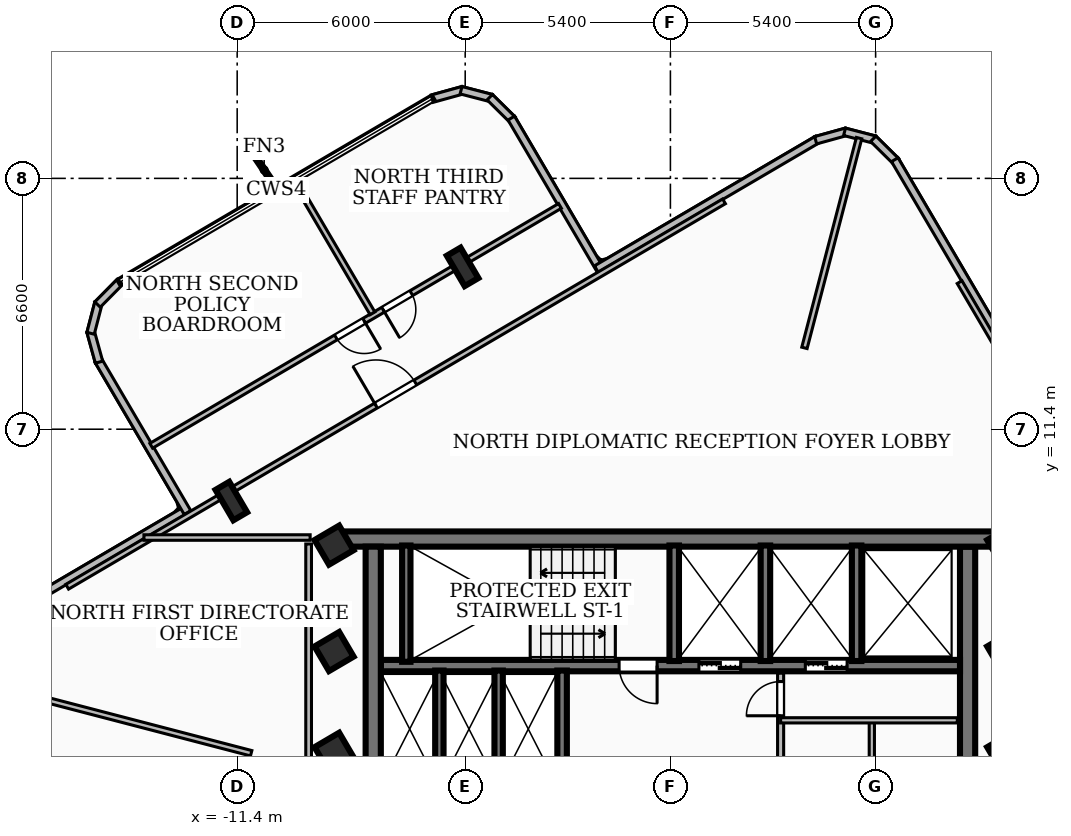
"""IFC4 building model, lengths in metres.
Left out: names, types, materials, properties, quantities, classifications, styles, units other than length and angle.
Written with IfcOpenShell. Run it as: python <this file> out.ifc"""

import sys

from ifc_helpers import new_model, si_unit, direction, frame, frame_2d, origin, origin_2d, place, context, subcontext, project, spatial, rectangle, i_section, extrude, element, fill, save


model = new_model("IFC4")
c1 = context("Model", 3, precision=1e-05, world=origin(), true_north=direction((0.0, 1.0)))
c2 = subcontext(c1, "Body", "Model", "MODEL_VIEW")
j1 = project(units=[si_unit("LENGTHUNIT", "METRE"), si_unit("PLANEANGLEUNIT", "RADIAN")], contexts=[c1])
p1 = place(None, origin())
s1 = spatial("IfcSite", under=j1, at=p1, CompositionType="ELEMENT")
p2 = place(p1, origin())
s2 = spatial("IfcBuilding", under=s1, at=p2, CompositionType="ELEMENT")
p3 = place(p2, frame((0.0, 0.0, 212.04)))
s3 = spatial("IfcBuildingStorey", under=s2, at=p3, CompositionType="ELEMENT", Elevation=212.04)
p4 = place(p3, frame((-8.78, 8.51, 0.0), z_axis=(0.0, 0.0, 1.0), x_axis=(1.0, 0.0, 0.0)))
e1 = element("IfcWall", 1, at=p4, inside=s3, PredefinedType="SHEAR", context=c2, shape_type="SweptSolid", body=[
    extrude(rectangle(XDim=17.56, YDim=0.4, at=frame_2d((8.78, 0.0))), origin(), (0.0, 0.0, 1.0), 3.16),
])
for number, where, z_axis, x_axis in (
    (2, (-7.82, 1.95, 0.0), (0.0, 0.0, 1.0), (0.0, 1.0, 0.0)),
    (3, (7.82, 8.31, 0.0), (0.0, 0.0, 1.0), (0.0, -1.0, 0.0)),
):
    element("IfcWall", number, at=place(p3, frame(where, z_axis=z_axis, x_axis=x_axis)), inside=s3, PredefinedType="SHEAR", context=c2, shape_type="SweptSolid", body=[
        extrude(rectangle(XDim=6.36, YDim=0.4, at=frame_2d((3.18, 0.0))), origin(), (0.0, 0.0, 1.0), 3.16),
    ])
p5 = place(p3, frame((7.62, 5.18, 0.0), z_axis=(0.0, 0.0, 1.0), x_axis=(-1.0, 0.0, 0.0)))
e4 = element("IfcWall", 4, at=p5, inside=s3, PredefinedType="SOLIDWALL", context=c2, shape_type="SweptSolid", body=[
    extrude(rectangle(XDim=15.24, YDim=0.3, at=frame_2d((7.62, 0.0))), origin(), (0.0, 0.0, 1.0), 3.16),
])
p6 = place(p5, frame((5.77, 0.0, 0.0)))
e5 = element("IfcOpeningElement", 5, at=p6, cuts=e4, PredefinedType="OPENING", context=c2, shape_type="SweptSolid", body=[
    extrude(rectangle(XDim=1.1, YDim=2.15, at=frame_2d((0.55, 1.075))), frame((0.0, 0.16, 0.0), z_axis=(0.0, -1.0, 0.0), x_axis=(1.0, 0.0, 0.0)), (0.0, 0.0, 1.0), 0.32),
])
p7 = place(p5, frame((2.97, 0.0, 0.0)))
e6 = element("IfcOpeningElement", 6, at=p7, cuts=e4, PredefinedType="OPENING", context=c2, shape_type="SweptSolid", body=[
    extrude(rectangle(XDim=1.1, YDim=2.15, at=frame_2d((0.55, 1.075))), frame((0.0, 0.16, 0.0), z_axis=(0.0, -1.0, 0.0), x_axis=(1.0, 0.0, 0.0)), (0.0, 0.0, 1.0), 0.32),
])
p8 = place(p5, frame((7.97, 0.0, 0.0)))
e7 = element("IfcOpeningElement", 7, at=p8, cuts=e4, PredefinedType="OPENING", context=c2, shape_type="SweptSolid", body=[
    extrude(rectangle(XDim=1.0, YDim=2.1, at=frame_2d((0.5, 1.05))), frame((0.0, 0.16, 0.0), z_axis=(0.0, -1.0, 0.0), x_axis=(1.0, 0.0, 0.0)), (0.0, 0.0, 1.0), 0.32),
])
p9 = place(p3, frame((-6.95, 5.28, 0.0), z_axis=(0.0, 0.0, 1.0), x_axis=(0.0, 1.0, 0.0)))
e8 = element("IfcWall", 8, at=p9, inside=s3, PredefinedType="SOLIDWALL", context=c2, shape_type="SweptSolid", body=[
    extrude(rectangle(XDim=3.06, YDim=0.22, at=frame_2d((1.53, 0.0))), origin(), (0.0, 0.0, 1.0), 3.16),
])
for number, where, z_axis, x_axis in (
    (9, (0.1, 5.3, 0.0), (0.0, 0.0, 1.0), (0.0, 1.0, 0.0)),
    (10, (2.5, 5.3, 0.0), (0.0, 0.0, 1.0), (0.0, 1.0, 0.0)),
    (11, (4.9, 5.3, 0.0), (0.0, 0.0, 1.0), (0.0, 1.0, 0.0)),
):
    element("IfcWall", number, at=place(p3, frame(where, z_axis=z_axis, x_axis=x_axis)), inside=s3, PredefinedType="SOLIDWALL", context=c2, shape_type="SweptSolid", body=[
        extrude(rectangle(XDim=3.04, YDim=0.25, at=frame_2d((1.52, 0.0))), origin(), (0.0, 0.0, 1.0), 3.16),
    ])
p10 = place(p3, frame((-2.85, 1.98, 0.0), z_axis=(0.0, 0.0, 1.0), x_axis=(0.0, 1.0, 0.0)))
e12 = element("IfcWall", 12, at=p10, inside=s3, PredefinedType="SOLIDWALL", context=c2, shape_type="SweptSolid", body=[
    extrude(rectangle(XDim=3.07, YDim=0.25, at=frame_2d((1.535, 0.0))), origin(), (0.0, 0.0, 1.0), 3.16),
])
for number, where, z_axis, x_axis in (
    (13, (-6.08, 1.98, 0.0), (0.0, 0.0, 1.0), (0.0, 1.0, 0.0)),
    (14, (-4.52, 1.98, 0.0), (0.0, 0.0, 1.0), (0.0, 1.0, 0.0)),
):
    element("IfcWall", number, at=place(p3, frame(where, z_axis=z_axis, x_axis=x_axis)), inside=s3, PredefinedType="SOLIDWALL", context=c2, shape_type="SweptSolid", body=[
        extrude(rectangle(XDim=3.07, YDim=0.22, at=frame_2d((1.535, 0.0))), origin(), (0.0, 0.0, 1.0), 3.16),
    ])
for number, where, z_axis, x_axis in (
    (15, (-8.85, 2.9, 0.0), (0.0, 0.0, 1.0), (0.863, 0.506, 0.0)),
    (16, (-8.85, 5.55, 0.0), (0.0, 0.0, 1.0), (0.863, 0.506, 0.0)),
    (17, (8.85, 2.9, 0.0), (0.0, 0.0, 1.0), (0.863, 0.506, 0.0)),
    (18, (8.85, 5.55, 0.0), (0.0, 0.0, 1.0), (0.863, 0.506, 0.0)),
    (19, (-8.85, 8.35, 0.0), (0.0, 0.0, 1.0), (0.863, 0.506, 0.0)),
    (20, (8.85, 8.35, 0.0), (0.0, 0.0, 1.0), (0.863, 0.506, 0.0)),
):
    element("IfcColumn", number, at=place(p3, frame(where, z_axis=z_axis, x_axis=x_axis)), inside=s3, PredefinedType="COLUMN", context=c2, shape_type="SweptSolid", body=[
        extrude(rectangle(XDim=0.75, YDim=0.75, at=origin_2d()), origin(), (0.0, 0.0, 1.0), 3.42),
    ])
for number, where, z_axis, x_axis in (
    (21, (-5.468, 15.671, 0.0), (0.0, 0.0, 1.0), (0.863, 0.506, 0.0)),
    (22, (-11.554, 9.51, 0.0), (0.0, 0.0, 1.0), (0.863, 0.506, 0.0)),
):
    element("IfcColumn", number, at=place(p3, frame(where, z_axis=z_axis, x_axis=x_axis)), inside=s3, PredefinedType="COLUMN", context=c2, shape_type="SweptSolid", body=[
        extrude(i_section(OverallWidth=0.418, OverallDepth=0.927, WebThickness=0.019, FlangeThickness=0.032, at=origin_2d()), origin(), (0.0, 0.0, 1.0), 3.42),
    ])
p11 = place(p3, frame((-5.904, -18.492, 0.0), z_axis=(0.0, 0.0, 1.0), x_axis=(-0.506046465446, 0.862506217258, 0.0)))
e23 = element("IfcWall", 23, at=p11, inside=s3, PredefinedType="SOLIDWALL", context=c2, shape_type="SweptSolid", body=[
    extrude(rectangle(XDim=25.924, YDim=0.2, at=frame_2d((12.962, 0.0))), origin(), (0.0, 0.0, 1.0), 3.16),
])
p12 = place(p11, frame((0.85, 0.0, 0.85)))
e24 = element("IfcOpeningElement", 24, at=p12, cuts=e23, PredefinedType="OPENING", context=c2, shape_type="SweptSolid", body=[
    extrude(rectangle(XDim=2.4, YDim=1.85, at=frame_2d((1.2, 0.925))), frame((0.0, 0.11, 0.0), z_axis=(0.0, -1.0, 0.0), x_axis=(1.0, 0.0, 0.0)), (0.0, 0.0, 1.0), 0.22),
])
p13 = place(p3, frame((-18.492, 5.904, 0.0), z_axis=(0.0, 0.0, 1.0), x_axis=(0.86245977502, 0.506125613333, 0.0)))
e25 = element("IfcWall", 25, at=p13, inside=s3, PredefinedType="SOLIDWALL", context=c2, shape_type="SweptSolid", body=[
    extrude(rectangle(XDim=6.741, YDim=0.2, at=frame_2d((3.371, 0.0))), origin(), (0.0, 0.0, 1.0), 3.16),
])
p14 = place(p3, frame((-12.707, 9.207, 0.0), z_axis=(0.0, 0.0, 1.0), x_axis=(-0.505936854923, 0.862570518178, 0.0)))
e26 = element("IfcWall", 26, at=p14, inside=s3, PredefinedType="SOLIDWALL", context=c2, shape_type="SweptSolid", body=[
    extrude(rectangle(XDim=4.641, YDim=0.2, at=frame_2d((2.32, 0.0))), origin(), (0.0, 0.0, 1.0), 3.16),
])
p15 = place(p3, frame((-15.035, 13.164, 0.0), z_axis=(0.0, 0.0, 1.0), x_axis=(-0.266246353668, 0.963905015631, 0.0)))
e27 = element("IfcWall", 27, at=p15, inside=s3, PredefinedType="SOLIDWALL", context=c2, shape_type="SweptSolid", body=[
    extrude(rectangle(XDim=0.838, YDim=0.2, at=frame_2d((0.419, 0.0))), origin(), (0.0, 0.0, 1.0), 3.16),
])
p16 = place(p3, frame((-15.257, 13.924, 0.0), z_axis=(0.0, 0.0, 1.0), x_axis=(0.251167733737, 0.967943577658, 0.0)))
e28 = element("IfcWall", 28, at=p16, inside=s3, PredefinedType="SOLIDWALL", context=c2, shape_type="SweptSolid", body=[
    extrude(rectangle(XDim=0.824, YDim=0.2, at=frame_2d((0.412, 0.0))), origin(), (0.0, 0.0, 1.0), 3.16),
])
p17 = place(p3, frame((-15.074, 14.68, 0.0), z_axis=(0.0, 0.0, 1.0), x_axis=(0.702877524881, 0.711310891957, 0.0)))
e29 = element("IfcWall", 29, at=p17, inside=s3, PredefinedType="SOLIDWALL", context=c2, shape_type="SweptSolid", body=[
    extrude(rectangle(XDim=0.84, YDim=0.2, at=frame_2d((0.42, 0.0))), origin(), (0.0, 0.0, 1.0), 3.16),
])
p18 = place(p3, frame((-6.269, 20.097, 0.0), z_axis=(0.0, 0.0, 1.0), x_axis=(0.963925656212, 0.266171616247, 0.0)))
e30 = element("IfcWall", 30, at=p18, inside=s3, PredefinedType="SOLIDWALL", context=c2, shape_type="SweptSolid", body=[
    extrude(rectangle(XDim=0.838, YDim=0.2, at=frame_2d((0.419, 0.0))), origin(), (0.0, 0.0, 1.0), 3.16),
])
p19 = place(p3, frame((-5.509, 20.319, 0.0), z_axis=(0.0, 0.0, 1.0), x_axis=(0.967962254737, -0.251095745493, 0.0)))
e31 = element("IfcWall", 31, at=p19, inside=s3, PredefinedType="SOLIDWALL", context=c2, shape_type="SweptSolid", body=[
    extrude(rectangle(XDim=0.824, YDim=0.2, at=frame_2d((0.412, 0.0))), origin(), (0.0, 0.0, 1.0), 3.16),
])
p20 = place(p3, frame((-4.753, 20.136, 0.0), z_axis=(0.0, 0.0, 1.0), x_axis=(0.711167178618, -0.70302293281, 0.0)))
e32 = element("IfcWall", 32, at=p20, inside=s3, PredefinedType="SOLIDWALL", context=c2, shape_type="SweptSolid", body=[
    extrude(rectangle(XDim=0.839, YDim=0.2, at=frame_2d((0.42, 0.0))), origin(), (0.0, 0.0, 1.0), 3.16),
])
p21 = place(p3, frame((-4.187, 19.586, 0.0), z_axis=(0.0, 0.0, 1.0), x_axis=(0.505936854923, -0.862570518178, 0.0)))
e33 = element("IfcWall", 33, at=p21, inside=s3, PredefinedType="SOLIDWALL", context=c2, shape_type="SweptSolid", body=[
    extrude(rectangle(XDim=4.641, YDim=0.2, at=frame_2d((2.32, 0.0))), origin(), (0.0, 0.0, 1.0), 3.16),
])
p22 = place(p3, frame((-1.948, 15.612, 0.0), z_axis=(0.0, 0.0, 1.0), x_axis=(0.86259717351, 0.505891407569, 0.0)))
e34 = element("IfcWall", 34, at=p22, inside=s3, PredefinedType="SOLIDWALL", context=c2, shape_type="SweptSolid", body=[
    extrude(rectangle(XDim=6.742, YDim=0.2, at=frame_2d((3.371, 0.0))), origin(), (0.0, 0.0, 1.0), 3.16),
])
p23 = place(p3, frame((3.822, 19.003, 0.0), z_axis=(0.0, 0.0, 1.0), x_axis=(0.963905015631, 0.266246353668, 0.0)))
e35 = element("IfcWall", 35, at=p23, inside=s3, PredefinedType="SOLIDWALL", context=c2, shape_type="SweptSolid", body=[
    extrude(rectangle(XDim=0.838, YDim=0.2, at=frame_2d((0.419, 0.0))), origin(), (0.0, 0.0, 1.0), 3.16),
])
p24 = place(p3, frame((4.582, 19.225, 0.0), z_axis=(0.0, 0.0, 1.0), x_axis=(0.967943577658, -0.251167733737, 0.0)))
e36 = element("IfcWall", 36, at=p24, inside=s3, PredefinedType="SOLIDWALL", context=c2, shape_type="SweptSolid", body=[
    extrude(rectangle(XDim=0.824, YDim=0.2, at=frame_2d((0.412, 0.0))), origin(), (0.0, 0.0, 1.0), 3.16),
])
p25 = place(p3, frame((5.338, 19.042, 0.0), z_axis=(0.0, 0.0, 1.0), x_axis=(0.711310891957, -0.702877524881, 0.0)))
e37 = element("IfcWall", 37, at=p25, inside=s3, PredefinedType="SOLIDWALL", context=c2, shape_type="SweptSolid", body=[
    extrude(rectangle(XDim=0.84, YDim=0.2, at=frame_2d((0.42, 0.0))), origin(), (0.0, 0.0, 1.0), 3.16),
])
p26 = place(p3, frame((5.904, 18.492, 0.0), z_axis=(0.0, 0.0, 1.0), x_axis=(0.506017844805, -0.862523008817, 0.0)))
e38 = element("IfcWall", 38, at=p26, inside=s3, PredefinedType="SOLIDWALL", context=c2, shape_type="SweptSolid", body=[
    extrude(rectangle(XDim=6.741, YDim=0.2, at=frame_2d((3.37, 0.0))), origin(), (0.0, 0.0, 1.0), 3.16),
])
p27 = place(p3, frame((2.9, 2.04, 0.0), z_axis=(0.0, 0.0, 1.0), x_axis=(0.0, 1.0, 0.0)))
e39 = element("IfcWall", 39, at=p27, inside=s3, PredefinedType="PARTITIONING", context=c2, shape_type="SweptSolid", body=[
    extrude(rectangle(XDim=2.94, YDim=0.16, at=frame_2d((1.47, 0.0))), origin(), (0.0, 0.0, 1.0), 2.39),
])
p28 = place(p27, frame((1.82, 0.0, 0.0)))
e40 = element("IfcOpeningElement", 40, at=p28, cuts=e39, PredefinedType="OPENING", context=c2, shape_type="SweptSolid", body=[
    extrude(rectangle(XDim=0.9, YDim=2.06, at=frame_2d((0.45, 1.03))), frame((0.0, 0.09, 0.0), z_axis=(0.0, -1.0, 0.0), x_axis=(1.0, 0.0, 0.0)), (0.0, 0.0, 1.0), 0.18),
])
p29 = place(p3, frame((2.9, 3.74, 0.0), z_axis=(0.0, 0.0, 1.0), x_axis=(1.0, 0.0, 0.0)))
e41 = element("IfcWall", 41, at=p29, inside=s3, PredefinedType="PARTITIONING", context=c2, shape_type="SweptSolid", body=[
    extrude(rectangle(XDim=4.65, YDim=0.138, at=frame_2d((2.325, 0.0))), origin(), (0.0, 0.0, 1.0), 3.16),
])
p30 = place(p3, frame((5.3, 1.85, 0.0), z_axis=(0.0, 0.0, 1.0), x_axis=(0.0, 1.0, 0.0)))
e42 = element("IfcWall", 42, at=p30, inside=s3, PredefinedType="PARTITIONING", context=c2, shape_type="SweptSolid", body=[
    extrude(rectangle(XDim=1.89, YDim=0.138, at=frame_2d((0.945, 0.0))), origin(), (0.0, 0.0, 1.0), 2.39),
])
p31 = place(p3, frame((-9.52, 1.75, 0.0), z_axis=(0.0, 0.0, 1.0), x_axis=(0.0, 1.0, 0.0)))
e43 = element("IfcWall", 43, at=p31, inside=s3, PredefinedType="PARTITIONING", context=c2, shape_type="SweptSolid", body=[
    extrude(rectangle(XDim=6.63, YDim=0.15, at=frame_2d((3.315, 0.0))), origin(), (0.0, 0.0, 1.0), 3.16),
])
p32 = place(p3, frame((-13.854, 8.55, 0.0), z_axis=(0.0, 0.0, 1.0), x_axis=(1.0, 0.0, 0.0)))
e44 = element("IfcWall", 44, at=p32, inside=s3, PredefinedType="PARTITIONING", context=c2, shape_type="SweptSolid", body=[
    extrude(rectangle(XDim=4.374, YDim=0.145, at=frame_2d((2.187, 0.0))), origin(), (0.0, 0.0, 1.0), 2.53),
])
p33 = place(p3, frame((3.527, 13.54, 0.0), z_axis=(0.0, 0.0, 1.0), x_axis=(0.252132617321, 0.967692690519, 0.0)))
e45 = element("IfcWall", 45, at=p33, inside=s3, PredefinedType="PARTITIONING", context=c2, shape_type="SweptSolid", body=[
    extrude(rectangle(XDim=5.703, YDim=0.145, at=frame_2d((2.852, 0.0))), origin(), (0.0, 0.0, 1.0), 3.16),
])
p34 = place(p3, frame((-11.032, 2.874, 0.0), z_axis=(0.0, 0.0, 1.0), x_axis=(-0.967704417597, 0.252087604146, 0.0)))
e46 = element("IfcWall", 46, at=p34, inside=s3, PredefinedType="PARTITIONING", context=c2, shape_type="SweptSolid", body=[
    extrude(rectangle(XDim=8.295, YDim=0.145, at=frame_2d((4.147, 0.0))), origin(), (0.0, 0.0, 1.0), 3.16),
])
p35 = place(p3, frame((11.632, 8.413, 0.0), z_axis=(0.0, 0.0, 1.0), x_axis=(-0.506057561451, 0.862499706955, 0.0)))
e47 = element("IfcWall", 47, at=p35, inside=s3, PredefinedType="PARTITIONING", context=c2, shape_type="SweptSolid", body=[
    extrude(rectangle(XDim=7.95, YDim=0.145, at=frame_2d((3.975, 0.0))), origin(), (0.0, 0.0, 1.0), 2.53),
])
p36 = place(p3, frame((-15.873, 7.255, 0.0), z_axis=(0.0, 0.0, 1.0), x_axis=(0.862498672631, 0.506059324299, 0.0)))
e48 = element("IfcWall", 48, at=p36, inside=s3, PredefinedType="PARTITIONING", context=c2, shape_type="SweptSolid", body=[
    extrude(rectangle(XDim=20.039, YDim=0.145, at=frame_2d((10.02, 0.0))), origin(), (0.0, 0.0, 1.0), 2.53),
])
p37 = place(p36, frame((9.42, 0.0, 0.0)))
e49 = element("IfcOpeningElement", 49, at=p37, cuts=e48, PredefinedType="OPENING", context=c2, shape_type="SweptSolid", body=[
    extrude(rectangle(XDim=1.2, YDim=2.1, at=frame_2d((0.6, 1.05))), frame((0.0, 0.083, 0.0), z_axis=(0.0, -1.0, 0.0), x_axis=(1.0, 0.0, 0.0)), (0.0, 0.0, 1.0), 0.165),
])
p38 = place(p3, frame((-7.84, 14.449, 0.0), z_axis=(0.0, 0.0, 1.0), x_axis=(-0.505991637753, 0.862538383218, 0.0)))
e50 = element("IfcWall", 50, at=p38, inside=s3, PredefinedType="PARTITIONING", context=c2, shape_type="SweptSolid", body=[
    extrude(rectangle(XDim=4.006, YDim=0.145, at=frame_2d((2.003, 0.0))), origin(), (0.0, 0.0, 1.0), 3.16),
])
p39 = place(p3, frame((-2.906, 17.275, 0.0), z_axis=(0.0, 0.0, 1.0), x_axis=(-0.862505879614, -0.506047040927, 0.0)))
e51 = element("IfcWall", 51, at=p39, inside=s3, PredefinedType="PARTITIONING", context=c2, shape_type="SweptSolid", body=[
    extrude(rectangle(XDim=12.471, YDim=0.145, at=frame_2d((6.235, 0.0))), origin(), (0.0, 0.0, 1.0), 2.53),
])
p40 = place(p39, frame((4.535, 0.0, 0.0)))
e52 = element("IfcOpeningElement", 52, at=p40, cuts=e51, PredefinedType="OPENING", context=c2, shape_type="SweptSolid", body=[
    extrude(rectangle(XDim=0.86, YDim=2.04, at=frame_2d((0.43, 1.02))), frame((0.0, 0.083, 0.0), z_axis=(0.0, -1.0, 0.0), x_axis=(1.0, 0.0, 0.0)), (0.0, 0.0, 1.0), 0.165),
])
p41 = place(p39, frame((5.975, 0.0, 0.0)))
e53 = element("IfcOpeningElement", 53, at=p41, cuts=e51, PredefinedType="OPENING", context=c2, shape_type="SweptSolid", body=[
    extrude(rectangle(XDim=0.86, YDim=2.04, at=frame_2d((0.43, 1.02))), frame((0.0, 0.083, 0.0), z_axis=(0.0, -1.0, 0.0), x_axis=(1.0, 0.0, 0.0)), (0.0, 0.0, 1.0), 0.165),
])
p42 = place(p6, origin())
e54 = element("IfcDoor", 54, at=p42, inside=s3, OperationType="DOUBLE_DOOR_SLIDING", PredefinedType="DOOR", context=c2, shape_type="SweptSolid", body=[
    extrude(rectangle(XDim=1.1, YDim=2.15, at=frame_2d((0.55, 1.075))), frame((0.0, 0.025, 0.0), z_axis=(0.0, -1.0, 0.0), x_axis=(1.0, 0.0, 0.0)), (0.0, 0.0, 1.0), 0.05),
])
fill(e5, e54)
p43 = place(p7, origin())
e55 = element("IfcDoor", 55, at=p43, inside=s3, OperationType="DOUBLE_DOOR_SLIDING", PredefinedType="DOOR", context=c2, shape_type="SweptSolid", body=[
    extrude(rectangle(XDim=1.1, YDim=2.15, at=frame_2d((0.55, 1.075))), frame((0.0, 0.025, 0.0), z_axis=(0.0, -1.0, 0.0), x_axis=(1.0, 0.0, 0.0)), (0.0, 0.0, 1.0), 0.05),
])
fill(e6, e55)
p44 = place(p8, origin())
e56 = element("IfcDoor", 56, at=p44, inside=s3, OperationType="SINGLE_SWING_LEFT", PredefinedType="DOOR", context=c2, shape_type="SweptSolid", body=[
    extrude(rectangle(XDim=1.0, YDim=2.1, at=frame_2d((0.5, 1.05))), frame((0.0, 0.025, 0.0), z_axis=(0.0, -1.0, 0.0), x_axis=(1.0, 0.0, 0.0)), (0.0, 0.0, 1.0), 0.05),
])
fill(e7, e56)
p45 = place(p28, origin())
e57 = element("IfcDoor", 57, at=p45, inside=s3, OperationType="SINGLE_SWING_LEFT", PredefinedType="DOOR", context=c2, shape_type="SweptSolid", body=[
    extrude(rectangle(XDim=0.9, YDim=2.06, at=frame_2d((0.45, 1.03))), frame((0.0, 0.025, 0.0), z_axis=(0.0, -1.0, 0.0), x_axis=(1.0, 0.0, 0.0)), (0.0, 0.0, 1.0), 0.05),
])
fill(e40, e57)
p46 = place(p37, origin())
e58 = element("IfcDoor", 58, at=p46, inside=s3, OperationType="SINGLE_SWING_LEFT", PredefinedType="DOOR", context=c2, shape_type="SweptSolid", body=[
    extrude(rectangle(XDim=1.2, YDim=2.1, at=frame_2d((0.6, 1.05))), frame((0.0, 0.025, 0.0), z_axis=(0.0, -1.0, 0.0), x_axis=(1.0, 0.0, 0.0)), (0.0, 0.0, 1.0), 0.05),
])
fill(e49, e58)
p47 = place(p40, origin())
e59 = element("IfcDoor", 59, at=p47, inside=s3, OperationType="SINGLE_SWING_RIGHT", PredefinedType="DOOR", context=c2, shape_type="SweptSolid", body=[
    extrude(rectangle(XDim=0.86, YDim=2.04, at=frame_2d((0.43, 1.02))), frame((0.0, 0.025, 0.0), z_axis=(0.0, -1.0, 0.0), x_axis=(1.0, 0.0, 0.0)), (0.0, 0.0, 1.0), 0.05),
])
fill(e52, e59)
p48 = place(p41, origin())
e60 = element("IfcDoor", 60, at=p48, inside=s3, OperationType="SINGLE_SWING_LEFT", PredefinedType="DOOR", context=c2, shape_type="SweptSolid", body=[
    extrude(rectangle(XDim=0.86, YDim=2.04, at=frame_2d((0.43, 1.02))), frame((0.0, 0.025, 0.0), z_axis=(0.0, -1.0, 0.0), x_axis=(1.0, 0.0, 0.0)), (0.0, 0.0, 1.0), 0.05),
])
fill(e53, e60)
save(model, sys.argv[1])
